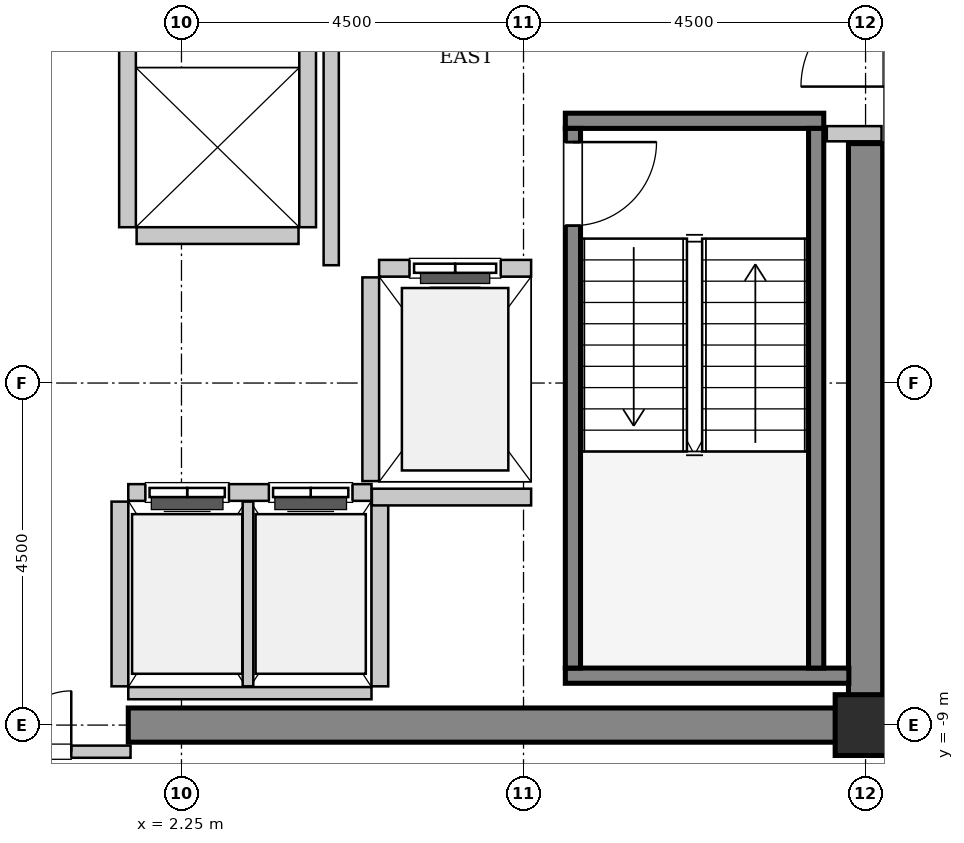
"""IFC4 building model, lengths in metres.
Left out: names, types, materials, properties, quantities, classifications, styles, units other than length and angle.
Written with IfcOpenShell. Run it as: python <this file> out.ifc"""

import sys

from ifc_helpers import new_model, si_unit, direction, frame, frame_2d, origin, origin_2d, place, context, subcontext, project, spatial, rectangle, hollow_rectangle, extrude, source, transform, mapped, element, fill, save


model = new_model("IFC4")
c1 = context("Model", 3, precision=1e-05, world=origin(), true_north=direction((0.0, 1.0)))
c2 = subcontext(c1, "Body", "Model", "MODEL_VIEW")
j1 = project(units=[si_unit("LENGTHUNIT", "METRE"), si_unit("PLANEANGLEUNIT", "RADIAN")], contexts=[c1])
p1 = place(None, origin())
s1 = spatial("IfcSite", under=j1, at=p1, CompositionType="ELEMENT")
p2 = place(p1, origin())
s2 = spatial("IfcBuilding", under=s1, at=p2, CompositionType="ELEMENT")
p3 = place(p2, frame((0.0, 0.0, 240.8)))
s3 = spatial("IfcBuildingStorey", under=s2, at=p3, CompositionType="ELEMENT", Elevation=240.8)
m1 = source(origin(), c2, "Body", "SweptSolid", [
    extrude(rectangle(XDim=9.925, YDim=0.45, at=frame_2d((4.962, 0.0))), origin(), (0.0, 0.0, 1.0), 3.8),
])
p4 = place(p3, frame((1.55, -9.0, 0.0), z_axis=(0.0, 0.0, 1.0), x_axis=(1.0, 0.0, 0.0)))
e1 = element("IfcWall", 1, at=p4, inside=s3, PredefinedType="SHEAR", context=c2, shape_type="MappedRepresentation", body=[
    mapped(m1, transform((0.0, 0.0, 0.0), x_axis=(1.0, 0.0, 0.0), y_axis=(0.0, 1.0, 0.0), z_axis=(0.0, 0.0, 1.0), scale=1.0)),
])
m2 = source(origin(), c2, "Body", "SweptSolid", [
    extrude(rectangle(XDim=7.425, YDim=0.45, at=frame_2d((3.712, 0.0))), origin(), (0.0, 0.0, 1.0), 3.8),
])
p5 = place(p3, frame((11.25, -8.775, 0.0), z_axis=(0.0, 0.0, 1.0), x_axis=(0.0, 1.0, 0.0)))
e2 = element("IfcWall", 2, at=p5, inside=s3, PredefinedType="SHEAR", context=c2, shape_type="MappedRepresentation", body=[
    mapped(m2, transform((0.0, 0.0, 0.0), x_axis=(1.0, 0.0, 0.0), y_axis=(0.0, 1.0, 0.0), z_axis=(0.0, 0.0, 1.0), scale=1.0)),
])
m3 = source(origin(), c2, "Body", "SweptSolid", [
    extrude(hollow_rectangle(XDim=0.8, YDim=0.8, WallThickness=0.04, InnerFilletRadius=0.04, OuterFilletRadius=0.08, at=origin_2d()), origin(), (0.0, 0.0, 1.0), 3.8),
])
p6 = place(p3, frame((11.25, -9.0, 0.0), z_axis=(0.0, 0.0, 1.0), x_axis=(1.0, 0.0, 0.0)))
e3 = element("IfcColumn", 3, at=p6, inside=s3, PredefinedType="COLUMN", context=c2, shape_type="MappedRepresentation", body=[
    mapped(m3, transform((0.0, 0.0, 0.0), x_axis=(1.0, 0.0, 0.0), y_axis=(0.0, 1.0, 0.0), z_axis=(0.0, 0.0, 1.0), scale=1.0)),
])
m4 = source(origin(), c2, "Body", "SweptSolid", [
    extrude(rectangle(XDim=3.4, YDim=0.2, at=frame_2d((1.7, 0.0))), origin(), (0.0, 0.0, 1.0), 3.8),
])
p7 = place(p3, frame((7.3, -1.05, 0.0), z_axis=(0.0, 0.0, 1.0), x_axis=(1.0, 0.0, 0.0)))
e4 = element("IfcWall", 4, at=p7, inside=s3, PredefinedType="SOLIDWALL", context=c2, shape_type="MappedRepresentation", body=[
    mapped(m4, transform((0.0, 0.0, 0.0), x_axis=(1.0, 0.0, 0.0), y_axis=(0.0, 1.0, 0.0), z_axis=(0.0, 0.0, 1.0), scale=1.0)),
])
m5 = source(origin(), c2, "Body", "SweptSolid", [
    extrude(rectangle(XDim=3.73, YDim=0.2, at=frame_2d((1.865, 0.0))), origin(), (0.0, 0.0, 1.0), 3.8),
])
p8 = place(p3, frame((7.3, -8.35, 0.0), z_axis=(0.0, 0.0, 1.0), x_axis=(1.0, 0.0, 0.0)))
e5 = element("IfcWall", 5, at=p8, inside=s3, PredefinedType="SOLIDWALL", context=c2, shape_type="MappedRepresentation", body=[
    mapped(m5, transform((0.0, 0.0, 0.0), x_axis=(1.0, 0.0, 0.0), y_axis=(0.0, 1.0, 0.0), z_axis=(0.0, 0.0, 1.0), scale=1.0)),
])
m6 = source(origin(), c2, "Body", "SweptSolid", [
    extrude(rectangle(XDim=7.1, YDim=0.2, at=frame_2d((3.55, 0.0))), origin(), (0.0, 0.0, 1.0), 3.8),
])
p9 = place(p3, frame((7.4, -1.15, 0.0), z_axis=(0.0, 0.0, 1.0), x_axis=(0.0, -1.0, 0.0)))
e6 = element("IfcWall", 6, at=p9, inside=s3, PredefinedType="SOLIDWALL", context=c2, shape_type="MappedRepresentation", body=[
    mapped(m6, transform((0.0, 0.0, 0.0), x_axis=(1.0, 0.0, 0.0), y_axis=(0.0, 1.0, 0.0), z_axis=(0.0, 0.0, 1.0), scale=1.0)),
])
p10 = place(p9, frame((0.18, 0.0, 0.0)))
e7 = element("IfcOpeningElement", 7, at=p10, cuts=e6, PredefinedType="OPENING", context=c2, shape_type="SweptSolid", body=[
    extrude(rectangle(XDim=1.1, YDim=2.15, at=frame_2d((0.55, 1.075))), frame((0.0, 0.11, 0.0), z_axis=(0.0, -1.0, 0.0), x_axis=(1.0, 0.0, 0.0)), (0.0, 0.0, 1.0), 0.22),
])
p11 = place(p3, frame((10.6, -1.15, 0.0), z_axis=(0.0, 0.0, 1.0), x_axis=(0.0, -1.0, 0.0)))
e8 = element("IfcWall", 8, at=p11, inside=s3, PredefinedType="SOLIDWALL", context=c2, shape_type="MappedRepresentation", body=[
    mapped(m6, transform((0.0, 0.0, 0.0), x_axis=(1.0, 0.0, 0.0), y_axis=(0.0, 1.0, 0.0), z_axis=(0.0, 0.0, 1.0), scale=1.0)),
])
m7 = source(origin(), c2, "Body", "SweptSolid", [
    extrude(rectangle(XDim=2.0, YDim=0.22, at=frame_2d((1.0, 0.0))), origin(), (0.0, 0.0, 1.0), 3.535),
])
p12 = place(p3, frame((6.85, -2.99, 0.0), z_axis=(0.0, 0.0, 1.0), x_axis=(-1.0, 0.0, 0.0)))
e9 = element("IfcWall", 9, at=p12, inside=s3, PredefinedType="SOLIDWALL", context=c2, shape_type="MappedRepresentation", body=[
    mapped(m7, transform((0.0, 0.0, 0.0), x_axis=(1.0, 0.0, 0.0), y_axis=(0.0, 1.0, 0.0), z_axis=(0.0, 0.0, 1.0), scale=1.0)),
])
p13 = place(p12, frame((0.4, 0.0, 0.0)))
e10 = element("IfcOpeningElement", 10, at=p13, cuts=e9, PredefinedType="OPENING", context=c2, shape_type="SweptSolid", body=[
    extrude(rectangle(XDim=1.2, YDim=2.2, at=frame_2d((0.6, 1.1))), frame((0.0, 0.12, 0.0), z_axis=(0.0, -1.0, 0.0), x_axis=(1.0, 0.0, 0.0)), (0.0, 0.0, 1.0), 0.24),
])
m8 = source(origin(), c2, "Body", "SweptSolid", [
    extrude(rectangle(XDim=2.68, YDim=0.22, at=frame_2d((1.34, 0.0))), origin(), (0.0, 0.0, 1.0), 3.535),
])
p14 = place(p3, frame((4.74, -3.11, 0.0), z_axis=(0.0, 0.0, 1.0), x_axis=(0.0, -1.0, 0.0)))
e11 = element("IfcWall", 11, at=p14, inside=s3, PredefinedType="SOLIDWALL", context=c2, shape_type="MappedRepresentation", body=[
    mapped(m8, transform((0.0, 0.0, 0.0), x_axis=(1.0, 0.0, 0.0), y_axis=(0.0, 1.0, 0.0), z_axis=(0.0, 0.0, 1.0), scale=1.0)),
])
m9 = source(origin(), c2, "Body", "SweptSolid", [
    extrude(rectangle(XDim=3.2, YDim=0.22, at=frame_2d((1.6, 0.0))), origin(), (0.0, 0.0, 1.0), 3.535),
])
p15 = place(p3, frame((4.75, -5.94, 0.0), z_axis=(0.0, 0.0, 1.0), x_axis=(-1.0, 0.0, 0.0)))
e12 = element("IfcWall", 12, at=p15, inside=s3, PredefinedType="SOLIDWALL", context=c2, shape_type="MappedRepresentation", body=[
    mapped(m9, transform((0.0, 0.0, 0.0), x_axis=(1.0, 0.0, 0.0), y_axis=(0.0, 1.0, 0.0), z_axis=(0.0, 0.0, 1.0), scale=1.0)),
])
p16 = place(p15, frame((1.875, 0.0, 0.0)))
e13 = element("IfcOpeningElement", 13, at=p16, cuts=e12, PredefinedType="OPENING", context=c2, shape_type="SweptSolid", body=[
    extrude(rectangle(XDim=1.1, YDim=2.2, at=frame_2d((0.55, 1.1))), frame((0.0, 0.12, 0.0), z_axis=(0.0, -1.0, 0.0), x_axis=(1.0, 0.0, 0.0)), (0.0, 0.0, 1.0), 0.24),
])
p17 = place(p15, frame((0.25, 0.0, 0.0)))
e14 = element("IfcOpeningElement", 14, at=p17, cuts=e12, PredefinedType="OPENING", context=c2, shape_type="SweptSolid", body=[
    extrude(rectangle(XDim=1.1, YDim=2.2, at=frame_2d((0.55, 1.1))), frame((0.0, 0.12, 0.0), z_axis=(0.0, -1.0, 0.0), x_axis=(1.0, 0.0, 0.0)), (0.0, 0.0, 1.0), 0.24),
])
m10 = source(origin(), c2, "Body", "SweptSolid", [
    extrude(rectangle(XDim=3.2, YDim=0.16, at=frame_2d((1.6, 0.0))), origin(), (0.0, 0.0, 1.0), 2.625),
])
p18 = place(p3, frame((1.55, -8.58, 0.0), z_axis=(0.0, 0.0, 1.0), x_axis=(1.0, 0.0, 0.0)))
e15 = element("IfcWall", 15, at=p18, inside=s3, PredefinedType="PARTITIONING", context=c2, shape_type="MappedRepresentation", body=[
    mapped(m10, transform((0.0, 0.0, 0.0), x_axis=(1.0, 0.0, 0.0), y_axis=(0.0, 1.0, 0.0), z_axis=(0.0, 0.0, 1.0), scale=1.0)),
])
m11 = source(origin(), c2, "Body", "SweptSolid", [
    extrude(rectangle(XDim=2.43, YDim=0.22, at=frame_2d((1.215, 0.0))), origin(), (0.0, 0.0, 1.0), 3.535),
])
p19 = place(p3, frame((1.44, -6.06, 0.0), z_axis=(0.0, 0.0, 1.0), x_axis=(0.0, -1.0, 0.0)))
e16 = element("IfcWall", 16, at=p19, inside=s3, PredefinedType="SOLIDWALL", context=c2, shape_type="MappedRepresentation", body=[
    mapped(m11, transform((0.0, 0.0, 0.0), x_axis=(1.0, 0.0, 0.0), y_axis=(0.0, 1.0, 0.0), z_axis=(0.0, 0.0, 1.0), scale=1.0)),
])
m12 = source(origin(), c2, "Body", "SweptSolid", [
    extrude(rectangle(XDim=2.43, YDim=0.14, at=frame_2d((1.215, 0.0))), origin(), (0.0, 0.0, 1.0), 3.535),
])
p20 = place(p3, frame((3.125, -8.49, 0.0), z_axis=(0.0, 0.0, 1.0), x_axis=(0.0, 1.0, 0.0)))
e17 = element("IfcWall", 17, at=p20, inside=s3, PredefinedType="PARTITIONING", context=c2, shape_type="MappedRepresentation", body=[
    mapped(m12, transform((0.0, 0.0, 0.0), x_axis=(1.0, 0.0, 0.0), y_axis=(0.0, 1.0, 0.0), z_axis=(0.0, 0.0, 1.0), scale=1.0)),
])
p21 = place(p3, frame((4.86, -8.49, 0.0), z_axis=(0.0, 0.0, 1.0), x_axis=(0.0, 1.0, 0.0)))
e18 = element("IfcWall", 18, at=p21, inside=s3, PredefinedType="SOLIDWALL", context=c2, shape_type="MappedRepresentation", body=[
    mapped(m11, transform((0.0, 0.0, 0.0), x_axis=(1.0, 0.0, 0.0), y_axis=(0.0, 1.0, 0.0), z_axis=(0.0, 0.0, 1.0), scale=1.0)),
])
m13 = source(origin(), c2, "Body", "SweptSolid", [
    extrude(rectangle(XDim=4.9, YDim=0.22, at=frame_2d((2.45, 0.0))), origin(), (0.0, 0.0, 1.0), 3.535),
])
for number, where, z_axis, x_axis in (
    (19, (1.54, 2.45, 0.0), (0.0, 0.0, 1.0), (0.0, -1.0, 0.0)),
    (20, (3.91, -2.45, 0.0), (0.0, 0.0, 1.0), (0.0, 1.0, 0.0)),
):
    element("IfcWall", number, at=place(p3, frame(where, z_axis=z_axis, x_axis=x_axis)), inside=s3, PredefinedType="SOLIDWALL", context=c2, shape_type="MappedRepresentation", body=[
        mapped(m13, transform((0.0, 0.0, 0.0), x_axis=(1.0, 0.0, 0.0), y_axis=(0.0, 1.0, 0.0), z_axis=(0.0, 0.0, 1.0), scale=1.0)),
    ])
m14 = source(origin(), c2, "Body", "SweptSolid", [
    extrude(rectangle(XDim=2.13, YDim=0.22, at=frame_2d((1.065, 0.0))), origin(), (0.0, 0.0, 1.0), 3.535),
])
p22 = place(p3, frame((1.66, -2.56, 0.0), z_axis=(0.0, 0.0, 1.0), x_axis=(1.0, 0.0, 0.0)))
e21 = element("IfcWall", 21, at=p22, inside=s3, PredefinedType="SOLIDWALL", context=c2, shape_type="MappedRepresentation", body=[
    mapped(m14, transform((0.0, 0.0, 0.0), x_axis=(1.0, 0.0, 0.0), y_axis=(0.0, 1.0, 0.0), z_axis=(0.0, 0.0, 1.0), scale=1.0)),
])
m15 = source(origin(), c2, "Body", "SweptSolid", [
    extrude(rectangle(XDim=2.095, YDim=0.22, at=frame_2d((1.048, 0.0))), origin(), (0.0, 0.0, 1.0), 3.535),
])
p23 = place(p3, frame((4.755, -6.0, 0.0), z_axis=(0.0, 0.0, 1.0), x_axis=(1.0, 0.0, 0.0)))
e22 = element("IfcWall", 22, at=p23, inside=s3, PredefinedType="SOLIDWALL", context=c2, shape_type="MappedRepresentation", body=[
    mapped(m15, transform((0.0, 0.0, 0.0), x_axis=(1.0, 0.0, 0.0), y_axis=(0.0, 1.0, 0.0), z_axis=(0.0, 0.0, 1.0), scale=1.0)),
])
m16 = source(origin(), c2, "Body", "SweptSolid", [
    extrude(rectangle(XDim=5.9, YDim=0.2, at=frame_2d((2.95, 0.0))), origin(), (0.0, 0.0, 1.0), 3.535),
])
p24 = place(p3, frame((4.22, -2.95, 0.0), z_axis=(0.0, 0.0, 1.0), x_axis=(0.0, 1.0, 0.0)))
e23 = element("IfcWall", 23, at=p24, inside=s3, PredefinedType="PARTITIONING", context=c2, shape_type="MappedRepresentation", body=[
    mapped(m16, transform((0.0, 0.0, 0.0), x_axis=(1.0, 0.0, 0.0), y_axis=(0.0, 1.0, 0.0), z_axis=(0.0, 0.0, 1.0), scale=1.0)),
])
m17 = source(origin(), c2, "Body", "SweptSolid", [
    extrude(rectangle(XDim=0.72, YDim=0.2, at=frame_2d((0.36, 0.0))), origin(), (0.0, 0.0, 1.0), 3.535),
])
p25 = place(p3, frame((10.74, -1.22, 0.0), z_axis=(0.0, 0.0, 1.0), x_axis=(1.0, 0.0, 0.0)))
e24 = element("IfcWall", 24, at=p25, inside=s3, PredefinedType="PARTITIONING", context=c2, shape_type="MappedRepresentation", body=[
    mapped(m17, transform((0.0, 0.0, 0.0), x_axis=(1.0, 0.0, 0.0), y_axis=(0.0, 1.0, 0.0), z_axis=(0.0, 0.0, 1.0), scale=1.0)),
])
m18 = source(origin(), c2, "Body", "SweptSolid", [
    extrude(rectangle(XDim=3.16, YDim=0.16, at=frame_2d((1.58, 0.0))), origin(), (0.0, 0.0, 1.0), 2.625),
])
p26 = place(p3, frame((-1.58, -9.35, 0.0), z_axis=(0.0, 0.0, 1.0), x_axis=(1.0, 0.0, 0.0)))
e25 = element("IfcWall", 25, at=p26, inside=s3, PredefinedType="PARTITIONING", context=c2, shape_type="MappedRepresentation", body=[
    mapped(m18, transform((0.0, 0.0, 0.0), x_axis=(1.0, 0.0, 0.0), y_axis=(0.0, 1.0, 0.0), z_axis=(0.0, 0.0, 1.0), scale=1.0)),
])
p27 = place(p26, frame((0.78, 0.0, 0.0)))
e26 = element("IfcOpeningElement", 26, at=p27, cuts=e25, PredefinedType="OPENING", context=c2, shape_type="SweptSolid", body=[
    extrude(rectangle(XDim=1.6, YDim=2.3, at=frame_2d((0.8, 1.15))), frame((0.0, 0.09, 0.0), z_axis=(0.0, -1.0, 0.0), x_axis=(1.0, 0.0, 0.0)), (0.0, 0.0, 1.0), 0.18),
])
m19 = source(origin(), c2, "Body", "SweptSolid", [
    extrude(rectangle(XDim=1.1, YDim=2.15, at=frame_2d((0.55, 1.075))), frame((0.0, 0.025, 0.0), z_axis=(0.0, -1.0, 0.0), x_axis=(1.0, 0.0, 0.0)), (0.0, 0.0, 1.0), 0.05),
])
p28 = place(p10, origin())
e27 = element("IfcDoor", 27, at=p28, inside=s3, OperationType="SINGLE_SWING_LEFT", PredefinedType="DOOR", context=c2, shape_type="MappedRepresentation", body=[
    mapped(m19, transform((0.0, 0.0, 0.0), x_axis=(1.0, 0.0, 0.0), y_axis=(0.0, 1.0, 0.0), z_axis=(0.0, 0.0, 1.0), scale=1.0)),
])
fill(e7, e27)
m20 = source(origin(), c2, "Body", "SweptSolid", [
    extrude(rectangle(XDim=1.2, YDim=2.2, at=frame_2d((0.6, 1.1))), frame((0.0, 0.025, 0.0), z_axis=(0.0, -1.0, 0.0), x_axis=(1.0, 0.0, 0.0)), (0.0, 0.0, 1.0), 0.05),
])
p29 = place(p13, origin())
e28 = element("IfcDoor", 28, at=p29, inside=s3, OperationType="SLIDING_TO_LEFT", PredefinedType="DOOR", context=c2, shape_type="MappedRepresentation", body=[
    mapped(m20, transform((0.0, 0.0, 0.0), x_axis=(1.0, 0.0, 0.0), y_axis=(0.0, 1.0, 0.0), z_axis=(0.0, 0.0, 1.0), scale=1.0)),
])
fill(e10, e28)
m21 = source(origin(), c2, "Body", "SweptSolid", [
    extrude(rectangle(XDim=1.1, YDim=2.2, at=frame_2d((0.55, 1.1))), frame((0.0, 0.025, 0.0), z_axis=(0.0, -1.0, 0.0), x_axis=(1.0, 0.0, 0.0)), (0.0, 0.0, 1.0), 0.05),
])
p30 = place(p16, origin())
e29 = element("IfcDoor", 29, at=p30, inside=s3, OperationType="DOUBLE_DOOR_SLIDING", PredefinedType="DOOR", context=c2, shape_type="MappedRepresentation", body=[
    mapped(m21, transform((0.0, 0.0, 0.0), x_axis=(1.0, 0.0, 0.0), y_axis=(0.0, 1.0, 0.0), z_axis=(0.0, 0.0, 1.0), scale=1.0)),
])
fill(e13, e29)
p31 = place(p17, origin())
e30 = element("IfcDoor", 30, at=p31, inside=s3, OperationType="DOUBLE_DOOR_SLIDING", PredefinedType="DOOR", context=c2, shape_type="MappedRepresentation", body=[
    mapped(m21, transform((0.0, 0.0, 0.0), x_axis=(1.0, 0.0, 0.0), y_axis=(0.0, 1.0, 0.0), z_axis=(0.0, 0.0, 1.0), scale=1.0)),
])
fill(e14, e30)
m22 = source(origin(), c2, "Body", "SweptSolid", [
    extrude(rectangle(XDim=1.6, YDim=2.3, at=frame_2d((0.8, 1.15))), frame((0.0, 0.025, 0.0), z_axis=(0.0, -1.0, 0.0), x_axis=(1.0, 0.0, 0.0)), (0.0, 0.0, 1.0), 0.05),
])
p32 = place(p27, origin())
e31 = element("IfcDoor", 31, at=p32, inside=s3, OperationType="DOUBLE_DOOR_SINGLE_SWING", PredefinedType="DOOR", context=c2, shape_type="MappedRepresentation", body=[
    mapped(m22, transform((0.0, 0.0, 0.0), x_axis=(1.0, 0.0, 0.0), y_axis=(0.0, 1.0, 0.0), z_axis=(0.0, 0.0, 1.0), scale=1.0)),
])
fill(e26, e31)
save(model, sys.argv[1])
